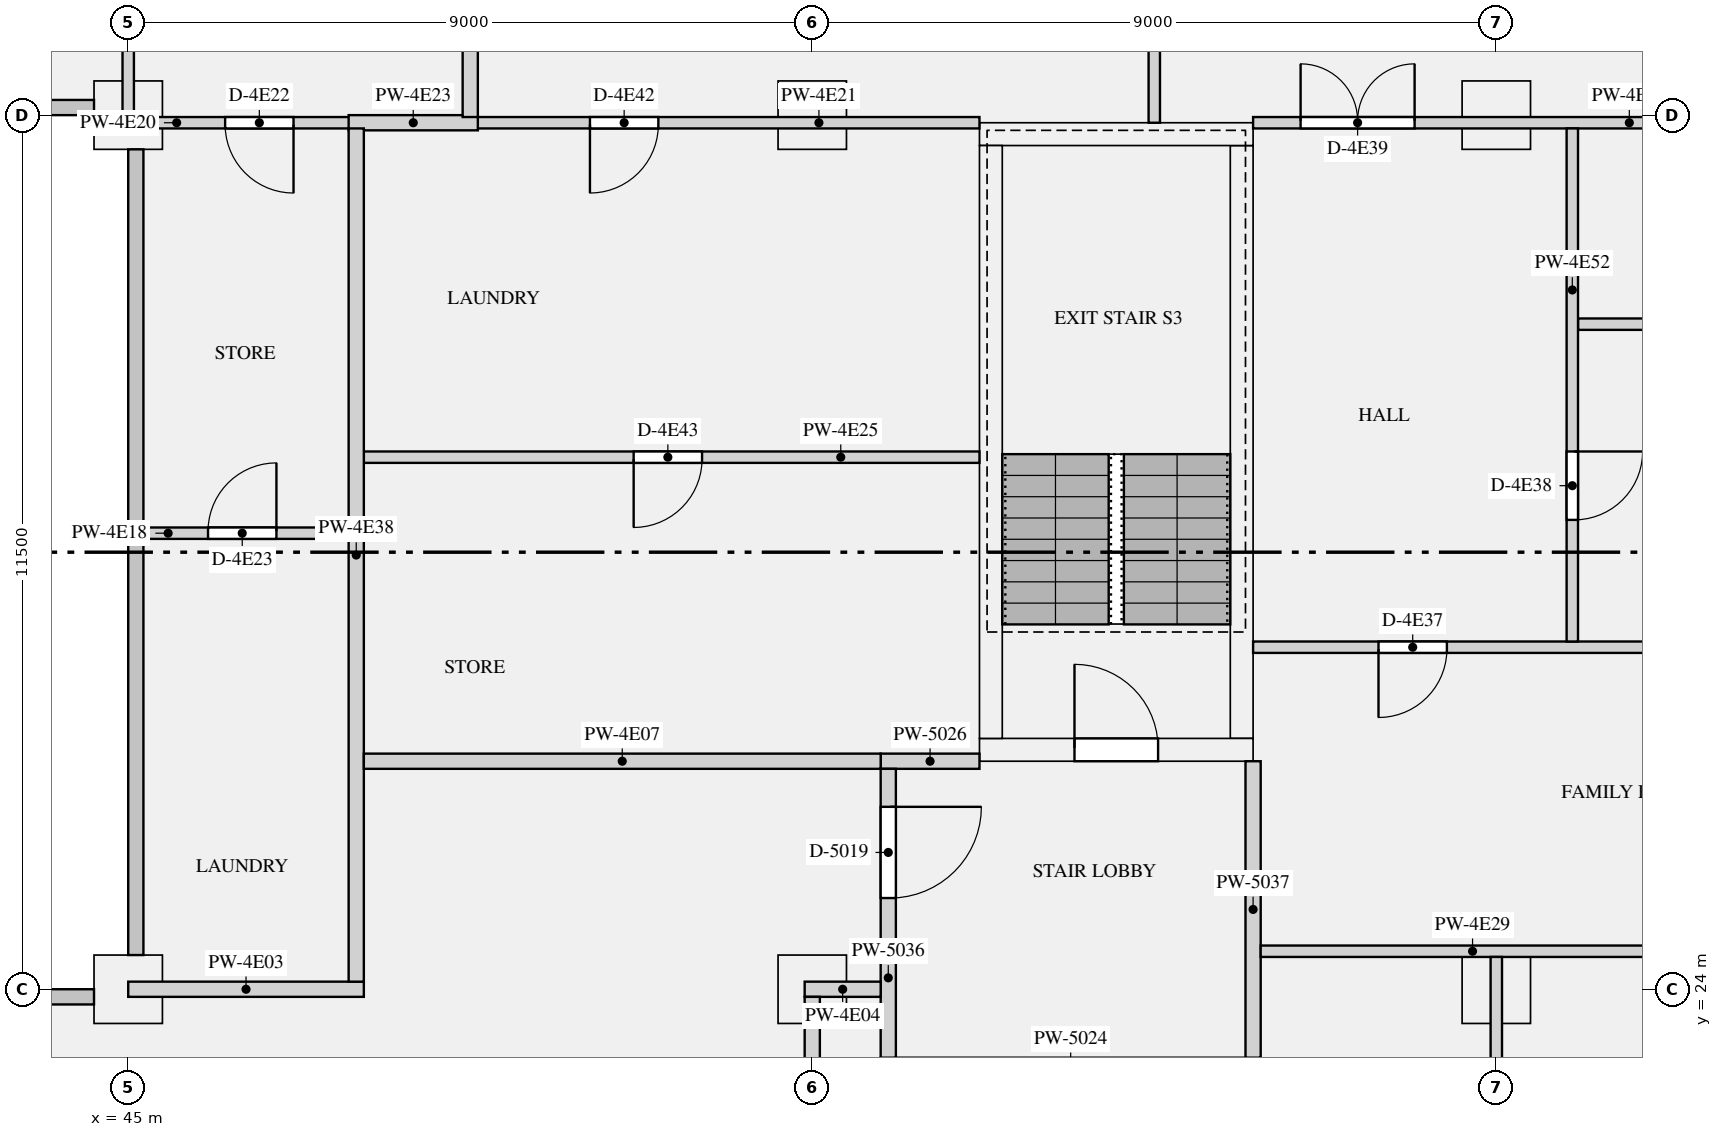
"""IFC4 building model, lengths in metres.
Left out: names, types, materials, properties, quantities, classifications, styles, units other than length and angle.
Written with IfcOpenShell. Run it as: python <this file> out.ifc"""

import sys

from ifc_helpers import new_model, si_unit, direction, frame, frame_2d, origin, origin_2d, place, context, subcontext, project, spatial, rectangle, extrude, element, fill, save


model = new_model("IFC4")
c1 = context("Model", 3, precision=1e-05, world=origin(), true_north=direction((0.0, 1.0)))
c2 = subcontext(c1, "Body", "Model", "MODEL_VIEW")
j1 = project(units=[si_unit("LENGTHUNIT", "METRE"), si_unit("PLANEANGLEUNIT", "RADIAN")], contexts=[c1])
p1 = place(None, origin())
s1 = spatial("IfcSite", under=j1, at=p1, CompositionType="ELEMENT")
p2 = place(p1, origin())
s2 = spatial("IfcBuilding", under=s1, at=p2, CompositionType="ELEMENT")
p3 = place(p2, frame((0.0, 0.0, 229.5)))
s3 = spatial("IfcBuildingStorey", under=s2, at=p3, CompositionType="ELEMENT", Elevation=229.5)
for number, where, z_axis, x_axis in (
    (1, (45.0, 24.0, 0.0), (0.0, 0.0, 1.0), (1.0, 0.0, 0.0)),
    (2, (54.0, 24.0, 0.0), (0.0, 0.0, 1.0), (1.0, 0.0, 0.0)),
    (3, (63.0, 24.0, 0.0), (0.0, 0.0, 1.0), (1.0, 0.0, 0.0)),
    (4, (45.0, 35.5, 0.0), (0.0, 0.0, 1.0), (1.0, 0.0, 0.0)),
    (5, (54.0, 35.5, 0.0), (0.0, 0.0, 1.0), (1.0, 0.0, 0.0)),
    (6, (63.0, 35.5, 0.0), (0.0, 0.0, 1.0), (1.0, 0.0, 0.0)),
):
    element("IfcColumn", number, at=place(p3, frame(where, z_axis=z_axis, x_axis=x_axis)), inside=s3, PredefinedType="COLUMN", context=c2, shape_type="SweptSolid", body=[
        extrude(rectangle(XDim=0.9, YDim=0.9, at=origin_2d()), origin(), (0.0, 0.0, 1.0), 3.15),
    ])
p4 = place(p3, frame((56.2, 27.15, 0.0), z_axis=(0.0, 0.0, 1.0), x_axis=(1.0, 0.0, 0.0)))
e7 = element("IfcWall", 7, at=p4, inside=s3, PredefinedType="SHEAR", context=c2, shape_type="SweptSolid", body=[
    extrude(rectangle(XDim=3.6, YDim=0.3, at=frame_2d((1.8, 0.0))), origin(), (0.0, 0.0, 1.0), 3.15),
])
p5 = place(p4, frame((1.25, 0.0, 0.0)))
e8 = element("IfcOpeningElement", 8, at=p5, cuts=e7, PredefinedType="OPENING", context=c2, shape_type="SweptSolid", body=[
    extrude(rectangle(XDim=1.1, YDim=2.1, at=frame_2d((0.55, 1.05))), frame((0.0, 0.16, 0.0), z_axis=(0.0, -1.0, 0.0), x_axis=(1.0, 0.0, 0.0)), (0.0, 0.0, 1.0), 0.32),
])
p6 = place(p3, frame((56.2, 35.25, 0.0), z_axis=(0.0, 0.0, 1.0), x_axis=(1.0, 0.0, 0.0)))
e9 = element("IfcWall", 9, at=p6, inside=s3, PredefinedType="SHEAR", context=c2, shape_type="SweptSolid", body=[
    extrude(rectangle(XDim=3.6, YDim=0.3, at=frame_2d((1.8, 0.0))), origin(), (0.0, 0.0, 1.0), 3.15),
])
for number, where, z_axis, x_axis in (
    (10, (56.35, 27.3, 0.0), (0.0, 0.0, 1.0), (0.0, 1.0, 0.0)),
    (11, (59.65, 27.3, 0.0), (0.0, 0.0, 1.0), (0.0, 1.0, 0.0)),
):
    element("IfcWall", number, at=place(p3, frame(where, z_axis=z_axis, x_axis=x_axis)), inside=s3, PredefinedType="SHEAR", context=c2, shape_type="SweptSolid", body=[
        extrude(rectangle(XDim=7.8, YDim=0.3, at=frame_2d((3.9, 0.0))), origin(), (0.0, 0.0, 1.0), 3.15),
    ])
p7 = place(p3, frame((54.9, 27.0, 0.0), z_axis=(0.0, 0.0, 1.0), x_axis=(1.0, 0.0, 0.0)))
e12 = element("IfcWall", 12, at=p7, inside=s3, PredefinedType="PARTITIONING", context=c2, shape_type="SweptSolid", body=[
    extrude(rectangle(XDim=1.3, YDim=0.2, at=frame_2d((0.65, 0.0))), origin(), (0.0, 0.0, 1.0), 2.83),
])
p8 = place(p3, frame((55.0, 23.1, 0.0), z_axis=(0.0, 0.0, 1.0), x_axis=(0.0, 1.0, 0.0)))
e13 = element("IfcWall", 13, at=p8, inside=s3, PredefinedType="PARTITIONING", context=c2, shape_type="SweptSolid", body=[
    extrude(rectangle(XDim=3.8, YDim=0.2, at=frame_2d((1.9, 0.0))), origin(), (0.0, 0.0, 1.0), 2.83),
])
p9 = place(p8, frame((2.1, 0.0, 0.0)))
e14 = element("IfcOpeningElement", 14, at=p9, cuts=e13, PredefinedType="OPENING", context=c2, shape_type="SweptSolid", body=[
    extrude(rectangle(XDim=1.2, YDim=2.1, at=frame_2d((0.6, 1.05))), frame((0.0, 0.11, 0.0), z_axis=(0.0, -1.0, 0.0), x_axis=(1.0, 0.0, 0.0)), (0.0, 0.0, 1.0), 0.22),
])
p10 = place(p3, frame((59.8, 23.1, 0.0), z_axis=(0.0, 0.0, 1.0), x_axis=(0.0, 1.0, 0.0)))
e15 = element("IfcWall", 15, at=p10, inside=s3, PredefinedType="PARTITIONING", context=c2, shape_type="SweptSolid", body=[
    extrude(rectangle(XDim=3.9, YDim=0.2, at=frame_2d((1.95, 0.0))), origin(), (0.0, 0.0, 1.0), 2.83),
])
p11 = place(p3, frame((45.0, 24.0, 0.0), z_axis=(0.0, 0.0, 1.0), x_axis=(1.0, 0.0, 0.0)))
e16 = element("IfcWall", 16, at=p11, inside=s3, PredefinedType="PARTITIONING", context=c2, shape_type="SweptSolid", body=[
    extrude(rectangle(XDim=3.1, YDim=0.2, at=frame_2d((1.55, 0.0))), origin(), (0.0, 0.0, 1.0), 2.83),
])
p12 = place(p3, frame((53.9, 24.0, 0.0), z_axis=(0.0, 0.0, 1.0), x_axis=(1.0, 0.0, 0.0)))
e17 = element("IfcWall", 17, at=p12, inside=s3, PredefinedType="PARTITIONING", context=c2, shape_type="SweptSolid", body=[
    extrude(rectangle(XDim=1.0, YDim=0.2, at=frame_2d((0.5, 0.0))), origin(), (0.0, 0.0, 1.0), 2.83),
])
p13 = place(p3, frame((48.1, 27.0, 0.0), z_axis=(0.0, 0.0, 1.0), x_axis=(1.0, 0.0, 0.0)))
e18 = element("IfcWall", 18, at=p13, inside=s3, PredefinedType="PARTITIONING", context=c2, shape_type="SweptSolid", body=[
    extrude(rectangle(XDim=6.8, YDim=0.2, at=frame_2d((3.4, 0.0))), origin(), (0.0, 0.0, 1.0), 2.83),
])
p14 = place(p3, frame((45.0, 30.0, 0.0), z_axis=(0.0, 0.0, 1.0), x_axis=(1.0, 0.0, 0.0)))
e19 = element("IfcWall", 19, at=p14, inside=s3, PredefinedType="PARTITIONING", context=c2, shape_type="SweptSolid", body=[
    extrude(rectangle(XDim=2.9, YDim=0.15, at=frame_2d((1.45, 0.0))), origin(), (0.0, 0.0, 1.0), 2.83),
])
p15 = place(p14, frame((1.05, 0.0, 0.0)))
e20 = element("IfcOpeningElement", 20, at=p15, cuts=e19, PredefinedType="OPENING", context=c2, shape_type="SweptSolid", body=[
    extrude(rectangle(XDim=0.9, YDim=2.1, at=frame_2d((0.45, 1.05))), frame((0.0, 0.085, 0.0), z_axis=(0.0, -1.0, 0.0), x_axis=(1.0, 0.0, 0.0)), (0.0, 0.0, 1.0), 0.17),
])
p16 = place(p3, frame((45.0, 35.4, 0.0), z_axis=(0.0, 0.0, 1.0), x_axis=(1.0, 0.0, 0.0)))
e21 = element("IfcWall", 21, at=p16, inside=s3, PredefinedType="PARTITIONING", context=c2, shape_type="SweptSolid", body=[
    extrude(rectangle(XDim=3.1, YDim=0.15, at=frame_2d((1.55, 0.0))), origin(), (0.0, 0.0, 1.0), 2.83),
])
p17 = place(p16, frame((1.275, 0.0, 0.0)))
e22 = element("IfcOpeningElement", 22, at=p17, cuts=e21, PredefinedType="OPENING", context=c2, shape_type="SweptSolid", body=[
    extrude(rectangle(XDim=0.9, YDim=2.1, at=frame_2d((0.45, 1.05))), frame((0.0, 0.085, 0.0), z_axis=(0.0, -1.0, 0.0), x_axis=(1.0, 0.0, 0.0)), (0.0, 0.0, 1.0), 0.17),
])
p18 = place(p3, frame((49.4, 35.4, 0.0), z_axis=(0.0, 0.0, 1.0), x_axis=(1.0, 0.0, 0.0)))
e23 = element("IfcWall", 23, at=p18, inside=s3, PredefinedType="PARTITIONING", context=c2, shape_type="SweptSolid", body=[
    extrude(rectangle(XDim=6.8, YDim=0.15, at=frame_2d((3.4, 0.0))), origin(), (0.0, 0.0, 1.0), 2.83),
])
p19 = place(p18, frame((1.675, 0.0, 0.0)))
e24 = element("IfcOpeningElement", 24, at=p19, cuts=e23, PredefinedType="OPENING", context=c2, shape_type="SweptSolid", body=[
    extrude(rectangle(XDim=0.9, YDim=2.1, at=frame_2d((0.45, 1.05))), frame((0.0, 0.085, 0.0), z_axis=(0.0, -1.0, 0.0), x_axis=(1.0, 0.0, 0.0)), (0.0, 0.0, 1.0), 0.17),
])
p20 = place(p3, frame((59.8, 35.4, 0.0), z_axis=(0.0, 0.0, 1.0), x_axis=(1.0, 0.0, 0.0)))
e25 = element("IfcWall", 25, at=p20, inside=s3, PredefinedType="PARTITIONING", context=c2, shape_type="SweptSolid", body=[
    extrude(rectangle(XDim=7.775, YDim=0.15, at=frame_2d((3.887, 0.0))), origin(), (0.0, 0.0, 1.0), 2.83),
])
p21 = place(p20, frame((0.625, 0.0, 0.0)))
e26 = element("IfcOpeningElement", 26, at=p21, cuts=e25, PredefinedType="OPENING", context=c2, shape_type="SweptSolid", body=[
    extrude(rectangle(XDim=1.5, YDim=2.1, at=frame_2d((0.75, 1.05))), frame((0.0, 0.085, 0.0), z_axis=(0.0, -1.0, 0.0), x_axis=(1.0, 0.0, 0.0)), (0.0, 0.0, 1.0), 0.17),
])
p22 = place(p3, frame((47.9, 35.4, 0.0), z_axis=(0.0, 0.0, 1.0), x_axis=(1.0, 0.0, 0.0)))
e27 = element("IfcWall", 27, at=p22, inside=s3, PredefinedType="PARTITIONING", context=c2, shape_type="SweptSolid", body=[
    extrude(rectangle(XDim=1.7, YDim=0.2, at=frame_2d((0.85, 0.0))), origin(), (0.0, 0.0, 1.0), 2.83),
])
p23 = place(p3, frame((48.1, 31.0, 0.0), z_axis=(0.0, 0.0, 1.0), x_axis=(1.0, 0.0, 0.0)))
e28 = element("IfcWall", 28, at=p23, inside=s3, PredefinedType="PARTITIONING", context=c2, shape_type="SweptSolid", body=[
    extrude(rectangle(XDim=8.1, YDim=0.15, at=frame_2d((4.05, 0.0))), origin(), (0.0, 0.0, 1.0), 2.83),
])
p24 = place(p23, frame((3.55, 0.0, 0.0)))
e29 = element("IfcOpeningElement", 29, at=p24, cuts=e28, PredefinedType="OPENING", context=c2, shape_type="SweptSolid", body=[
    extrude(rectangle(XDim=0.9, YDim=2.1, at=frame_2d((0.45, 1.05))), frame((0.0, 0.085, 0.0), z_axis=(0.0, -1.0, 0.0), x_axis=(1.0, 0.0, 0.0)), (0.0, 0.0, 1.0), 0.17),
])
p25 = place(p3, frame((64.075, 32.75, 0.0), z_axis=(0.0, 0.0, 1.0), x_axis=(1.0, 0.0, 0.0)))
e30 = element("IfcWall", 30, at=p25, inside=s3, PredefinedType="PARTITIONING", context=c2, shape_type="SweptSolid", body=[
    extrude(rectangle(XDim=7.275, YDim=0.15, at=frame_2d((3.638, 0.0))), origin(), (0.0, 0.0, 1.0), 2.83),
])
p26 = place(p25, frame((3.225, 0.0, 0.0)))
e31 = element("IfcOpeningElement", 31, at=p26, cuts=e30, PredefinedType="OPENING", context=c2, shape_type="SweptSolid", body=[
    extrude(rectangle(XDim=0.9, YDim=2.1, at=frame_2d((0.45, 1.05))), frame((0.0, 0.085, 0.0), z_axis=(0.0, -1.0, 0.0), x_axis=(1.0, 0.0, 0.0)), (0.0, 0.0, 1.0), 0.17),
])
p27 = place(p3, frame((59.9, 24.5, 0.0), z_axis=(0.0, 0.0, 1.0), x_axis=(1.0, 0.0, 0.0)))
e32 = element("IfcWall", 32, at=p27, inside=s3, PredefinedType="PARTITIONING", context=c2, shape_type="SweptSolid", body=[
    extrude(rectangle(XDim=8.95, YDim=0.15, at=frame_2d((4.475, 0.0))), origin(), (0.0, 0.0, 1.0), 2.83),
])
p28 = place(p27, frame((5.575, 0.0, 0.0)))
e33 = element("IfcOpeningElement", 33, at=p28, cuts=e32, PredefinedType="OPENING", context=c2, shape_type="SweptSolid", body=[
    extrude(rectangle(XDim=1.5, YDim=2.1, at=frame_2d((0.75, 1.05))), frame((0.0, 0.085, 0.0), z_axis=(0.0, -1.0, 0.0), x_axis=(1.0, 0.0, 0.0)), (0.0, 0.0, 1.0), 0.17),
])
p29 = place(p3, frame((59.8, 28.5, 0.0), z_axis=(0.0, 0.0, 1.0), x_axis=(1.0, 0.0, 0.0)))
e34 = element("IfcWall", 34, at=p29, inside=s3, PredefinedType="PARTITIONING", context=c2, shape_type="SweptSolid", body=[
    extrude(rectangle(XDim=9.05, YDim=0.15, at=frame_2d((4.525, 0.0))), origin(), (0.0, 0.0, 1.0), 2.83),
])
p30 = place(p29, frame((1.65, 0.0, 0.0)))
e35 = element("IfcOpeningElement", 35, at=p30, cuts=e34, PredefinedType="OPENING", context=c2, shape_type="SweptSolid", body=[
    extrude(rectangle(XDim=0.9, YDim=2.1, at=frame_2d((0.45, 1.05))), frame((0.0, 0.085, 0.0), z_axis=(0.0, -1.0, 0.0), x_axis=(1.0, 0.0, 0.0)), (0.0, 0.0, 1.0), 0.17),
])
p31 = place(p3, frame((54.0, 16.1, 0.0), z_axis=(0.0, 0.0, 1.0), x_axis=(0.0, 1.0, 0.0)))
e36 = element("IfcWall", 36, at=p31, inside=s3, PredefinedType="PARTITIONING", context=c2, shape_type="SweptSolid", body=[
    extrude(rectangle(XDim=7.8, YDim=0.2, at=frame_2d((3.9, 0.0))), origin(), (0.0, 0.0, 1.0), 2.83),
])
p32 = place(p31, frame((1.85, 0.0, 0.0)))
e37 = element("IfcOpeningElement", 37, at=p32, cuts=e36, PredefinedType="OPENING", context=c2, shape_type="SweptSolid", body=[
    extrude(rectangle(XDim=1.1, YDim=2.1, at=frame_2d((0.55, 1.05))), frame((0.0, 0.11, 0.0), z_axis=(0.0, -1.0, 0.0), x_axis=(1.0, 0.0, 0.0)), (0.0, 0.0, 1.0), 0.22),
])
p33 = place(p3, frame((48.0, 24.1, 0.0), z_axis=(0.0, 0.0, 1.0), x_axis=(0.0, 1.0, 0.0)))
e38 = element("IfcWall", 38, at=p33, inside=s3, PredefinedType="PARTITIONING", context=c2, shape_type="SweptSolid", body=[
    extrude(rectangle(XDim=11.225, YDim=0.2, at=frame_2d((5.612, 0.0))), origin(), (0.0, 0.0, 1.0), 2.83),
])
p34 = place(p3, frame((45.0, 35.5, 0.0), z_axis=(0.0, 0.0, 1.0), x_axis=(0.0, 1.0, 0.0)))
e39 = element("IfcWall", 39, at=p34, inside=s3, PredefinedType="PARTITIONING", context=c2, shape_type="SweptSolid", body=[
    extrude(rectangle(XDim=5.35, YDim=0.15, at=frame_2d((2.675, 0.0))), origin(), (0.0, 0.0, 1.0), 2.83),
])
p35 = place(p34, frame((2.525, 0.0, 0.0)))
e40 = element("IfcOpeningElement", 40, at=p35, cuts=e39, PredefinedType="OPENING", context=c2, shape_type="SweptSolid", body=[
    extrude(rectangle(XDim=0.9, YDim=2.1, at=frame_2d((0.45, 1.05))), frame((0.0, 0.085, 0.0), z_axis=(0.0, -1.0, 0.0), x_axis=(1.0, 0.0, 0.0)), (0.0, 0.0, 1.0), 0.17),
])
p36 = place(p3, frame((49.5, 35.475, 0.0), z_axis=(0.0, 0.0, 1.0), x_axis=(0.0, 1.0, 0.0)))
e41 = element("IfcWall", 41, at=p36, inside=s3, PredefinedType="PARTITIONING", context=c2, shape_type="SweptSolid", body=[
    extrude(rectangle(XDim=5.375, YDim=0.2, at=frame_2d((2.688, 0.0))), origin(), (0.0, 0.0, 1.0), 2.83),
])
p37 = place(p3, frame((58.5, 35.4, 0.0), z_axis=(0.0, 0.0, 1.0), x_axis=(0.0, 1.0, 0.0)))
e42 = element("IfcWall", 42, at=p37, inside=s3, PredefinedType="PARTITIONING", context=c2, shape_type="SweptSolid", body=[
    extrude(rectangle(XDim=5.45, YDim=0.15, at=frame_2d((2.725, 0.0))), origin(), (0.0, 0.0, 1.0), 2.83),
])
p38 = place(p37, frame((2.05, 0.0, 0.0)))
e43 = element("IfcOpeningElement", 43, at=p38, cuts=e42, PredefinedType="OPENING", context=c2, shape_type="SweptSolid", body=[
    extrude(rectangle(XDim=1.5, YDim=2.1, at=frame_2d((0.75, 1.05))), frame((0.0, 0.085, 0.0), z_axis=(0.0, -1.0, 0.0), x_axis=(1.0, 0.0, 0.0)), (0.0, 0.0, 1.0), 0.17),
])
p39 = place(p3, frame((63.0, 12.575, 0.0), z_axis=(0.0, 0.0, 1.0), x_axis=(0.0, 1.0, 0.0)))
e44 = element("IfcWall", 44, at=p39, inside=s3, PredefinedType="PARTITIONING", context=c2, shape_type="SweptSolid", body=[
    extrude(rectangle(XDim=11.85, YDim=0.15, at=frame_2d((5.925, 0.0))), origin(), (0.0, 0.0, 1.0), 2.83),
])
p40 = place(p39, frame((8.25, 0.0, 0.0)))
e45 = element("IfcOpeningElement", 45, at=p40, cuts=e44, PredefinedType="OPENING", context=c2, shape_type="SweptSolid", body=[
    extrude(rectangle(XDim=0.9, YDim=2.1, at=frame_2d((0.45, 1.05))), frame((0.0, 0.085, 0.0), z_axis=(0.0, -1.0, 0.0), x_axis=(1.0, 0.0, 0.0)), (0.0, 0.0, 1.0), 0.17),
])
p41 = place(p3, frame((64.0, 28.575, 0.0), z_axis=(0.0, 0.0, 1.0), x_axis=(0.0, 1.0, 0.0)))
e46 = element("IfcWall", 46, at=p41, inside=s3, PredefinedType="PARTITIONING", context=c2, shape_type="SweptSolid", body=[
    extrude(rectangle(XDim=6.75, YDim=0.15, at=frame_2d((3.375, 0.0))), origin(), (0.0, 0.0, 1.0), 2.83),
])
p42 = place(p41, frame((1.6, 0.0, 0.0)))
e47 = element("IfcOpeningElement", 47, at=p42, cuts=e46, PredefinedType="OPENING", context=c2, shape_type="SweptSolid", body=[
    extrude(rectangle(XDim=0.9, YDim=2.1, at=frame_2d((0.45, 1.05))), frame((0.0, 0.085, 0.0), z_axis=(0.0, -1.0, 0.0), x_axis=(1.0, 0.0, 0.0)), (0.0, 0.0, 1.0), 0.17),
])
p43 = place(p5, origin())
e48 = element("IfcDoor", 48, at=p43, inside=s3, OperationType="SINGLE_SWING_LEFT", PredefinedType="DOOR", context=c2, shape_type="SweptSolid", body=[
    extrude(rectangle(XDim=1.1, YDim=2.1, at=frame_2d((0.55, 1.05))), frame((0.0, 0.025, 0.0), z_axis=(0.0, -1.0, 0.0), x_axis=(1.0, 0.0, 0.0)), (0.0, 0.0, 1.0), 0.05),
])
fill(e8, e48)
p44 = place(p9, frame((1.2, 0.0, 0.0), z_axis=(0.0, 0.0, 1.0), x_axis=(-1.0, 0.0, 0.0)))
e49 = element("IfcDoor", 49, at=p44, inside=s3, OperationType="SINGLE_SWING_LEFT", PredefinedType="DOOR", context=c2, shape_type="SweptSolid", body=[
    extrude(rectangle(XDim=1.2, YDim=2.1, at=frame_2d((0.6, 1.05))), frame((0.0, 0.025, 0.0), z_axis=(0.0, -1.0, 0.0), x_axis=(1.0, 0.0, 0.0)), (0.0, 0.0, 1.0), 0.05),
])
fill(e14, e49)
p45 = place(p17, frame((0.9, 0.0, 0.0), z_axis=(0.0, 0.0, 1.0), x_axis=(-1.0, 0.0, 0.0)))
e50 = element("IfcDoor", 50, at=p45, inside=s3, OperationType="SINGLE_SWING_LEFT", PredefinedType="DOOR", context=c2, shape_type="SweptSolid", body=[
    extrude(rectangle(XDim=0.9, YDim=2.1, at=frame_2d((0.45, 1.05))), frame((0.0, 0.025, 0.0), z_axis=(0.0, -1.0, 0.0), x_axis=(1.0, 0.0, 0.0)), (0.0, 0.0, 1.0), 0.05),
])
fill(e22, e50)
p46 = place(p15, origin())
e51 = element("IfcDoor", 51, at=p46, inside=s3, OperationType="SINGLE_SWING_RIGHT", PredefinedType="DOOR", context=c2, shape_type="SweptSolid", body=[
    extrude(rectangle(XDim=0.9, YDim=2.1, at=frame_2d((0.45, 1.05))), frame((0.0, 0.025, 0.0), z_axis=(0.0, -1.0, 0.0), x_axis=(1.0, 0.0, 0.0)), (0.0, 0.0, 1.0), 0.05),
])
fill(e20, e51)
p47 = place(p30, frame((0.9, 0.0, 0.0), z_axis=(0.0, 0.0, 1.0), x_axis=(-1.0, 0.0, 0.0)))
e52 = element("IfcDoor", 52, at=p47, inside=s3, OperationType="SINGLE_SWING_RIGHT", PredefinedType="DOOR", context=c2, shape_type="SweptSolid", body=[
    extrude(rectangle(XDim=0.9, YDim=2.1, at=frame_2d((0.45, 1.05))), frame((0.0, 0.025, 0.0), z_axis=(0.0, -1.0, 0.0), x_axis=(1.0, 0.0, 0.0)), (0.0, 0.0, 1.0), 0.05),
])
fill(e35, e52)
p48 = place(p42, frame((0.9, 0.0, 0.0), z_axis=(0.0, 0.0, 1.0), x_axis=(-1.0, 0.0, 0.0)))
e53 = element("IfcDoor", 53, at=p48, inside=s3, OperationType="SINGLE_SWING_LEFT", PredefinedType="DOOR", context=c2, shape_type="SweptSolid", body=[
    extrude(rectangle(XDim=0.9, YDim=2.1, at=frame_2d((0.45, 1.05))), frame((0.0, 0.025, 0.0), z_axis=(0.0, -1.0, 0.0), x_axis=(1.0, 0.0, 0.0)), (0.0, 0.0, 1.0), 0.05),
])
fill(e47, e53)
p49 = place(p21, origin())
e54 = element("IfcDoor", 54, at=p49, inside=s3, OperationType="DOUBLE_DOOR_SINGLE_SWING", PredefinedType="DOOR", context=c2, shape_type="SweptSolid", body=[
    extrude(rectangle(XDim=1.5, YDim=2.1, at=frame_2d((0.75, 1.05))), frame((0.0, 0.025, 0.0), z_axis=(0.0, -1.0, 0.0), x_axis=(1.0, 0.0, 0.0)), (0.0, 0.0, 1.0), 0.05),
])
fill(e26, e54)
p50 = place(p19, frame((0.9, 0.0, 0.0), z_axis=(0.0, 0.0, 1.0), x_axis=(-1.0, 0.0, 0.0)))
e55 = element("IfcDoor", 55, at=p50, inside=s3, OperationType="SINGLE_SWING_RIGHT", PredefinedType="DOOR", context=c2, shape_type="SweptSolid", body=[
    extrude(rectangle(XDim=0.9, YDim=2.1, at=frame_2d((0.45, 1.05))), frame((0.0, 0.025, 0.0), z_axis=(0.0, -1.0, 0.0), x_axis=(1.0, 0.0, 0.0)), (0.0, 0.0, 1.0), 0.05),
])
fill(e24, e55)
p51 = place(p24, frame((0.9, 0.0, 0.0), z_axis=(0.0, 0.0, 1.0), x_axis=(-1.0, 0.0, 0.0)))
e56 = element("IfcDoor", 56, at=p51, inside=s3, OperationType="SINGLE_SWING_RIGHT", PredefinedType="DOOR", context=c2, shape_type="SweptSolid", body=[
    extrude(rectangle(XDim=0.9, YDim=2.1, at=frame_2d((0.45, 1.05))), frame((0.0, 0.025, 0.0), z_axis=(0.0, -1.0, 0.0), x_axis=(1.0, 0.0, 0.0)), (0.0, 0.0, 1.0), 0.05),
])
fill(e29, e56)
save(model, sys.argv[1])
